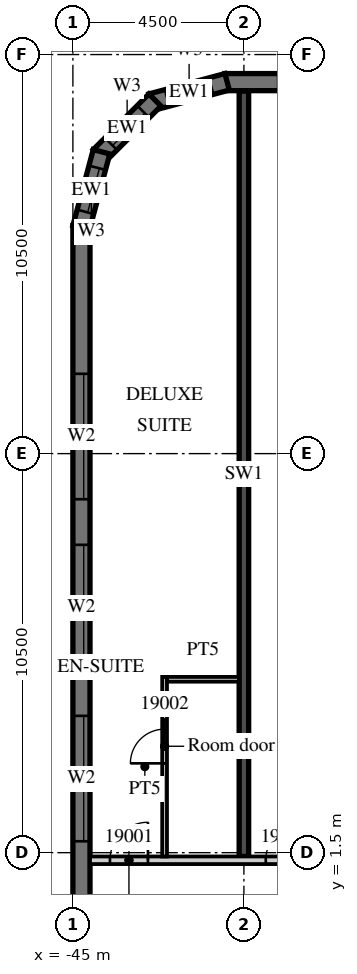
"""IFC4 building model, lengths in metres.
Left out: names, types, materials, properties, quantities, classifications, styles, units other than length and angle.
Written with IfcOpenShell. Run it as: python <this file> out.ifc"""

import sys

from ifc_helpers import new_model, si_unit, direction, frame, frame_2d, origin, place, context, subcontext, project, spatial, polyline, rectangle, outline, extrude, element, fill, save


model = new_model("IFC4")
c1 = context("Model", 3, precision=1e-05, world=origin(), true_north=direction((0.0, 1.0)))
c2 = subcontext(c1, "Body", "Model", "MODEL_VIEW")
j1 = project(units=[si_unit("LENGTHUNIT", "METRE"), si_unit("PLANEANGLEUNIT", "RADIAN")], contexts=[c1])
p1 = place(None, origin())
s1 = spatial("IfcSite", under=j1, at=p1, CompositionType="ELEMENT")
p2 = place(p1, origin())
s2 = spatial("IfcBuilding", under=s1, at=p2, CompositionType="ELEMENT")
p3 = place(p2, frame((0.0, 0.0, 93.0)))
s3 = spatial("IfcBuildingStorey", under=s2, at=p3, CompositionType="ELEMENT", Elevation=93.0)
p4 = place(p3, frame((-40.5, 1.4, 0.0), z_axis=(0.0, 0.0, 1.0), x_axis=(0.0, 1.0, 0.0)))
e1 = element("IfcWall", 1, at=p4, inside=s3, PredefinedType="SHEAR", context=c2, shape_type="SweptSolid", body=[
    extrude(rectangle(XDim=20.14, YDim=0.25, at=frame_2d((10.07, 0.0))), origin(), (0.0, 0.0, 1.0), 3.3),
])
p5 = place(p3, frame((13.5, 21.775, 0.0), z_axis=(0.0, 0.0, 1.0), x_axis=(-1.0, 0.0, 0.0)))
e2 = element("IfcWall", 2, at=p5, inside=s3, PredefinedType="SOLIDWALL", context=c2, shape_type="SweptSolid", body=[
    extrude(rectangle(XDim=54.5, YDim=0.45, at=frame_2d((27.25, 0.0))), origin(), (0.0, 0.0, 1.0), 3.02),
])
p6 = place(p5, frame((0.9, 0.0, 0.45)))
e3 = element("IfcOpeningElement", 3, at=p6, cuts=e2, PredefinedType="OPENING", context=c2, shape_type="SweptSolid", body=[
    extrude(rectangle(XDim=2.7, YDim=2.25, at=frame_2d((1.35, 1.125))), frame((0.0, 0.235, 0.0), z_axis=(0.0, -1.0, 0.0), x_axis=(1.0, 0.0, 0.0)), (0.0, 0.0, 1.0), 0.47),
])
p7 = place(p5, frame((5.4, 0.0, 0.45)))
e4 = element("IfcOpeningElement", 4, at=p7, cuts=e2, PredefinedType="OPENING", context=c2, shape_type="SweptSolid", body=[
    extrude(rectangle(XDim=2.7, YDim=2.25, at=frame_2d((1.35, 1.125))), frame((0.0, 0.235, 0.0), z_axis=(0.0, -1.0, 0.0), x_axis=(1.0, 0.0, 0.0)), (0.0, 0.0, 1.0), 0.47),
])
p8 = place(p5, frame((9.9, 0.0, 0.45)))
e5 = element("IfcOpeningElement", 5, at=p8, cuts=e2, PredefinedType="OPENING", context=c2, shape_type="SweptSolid", body=[
    extrude(rectangle(XDim=2.7, YDim=2.25, at=frame_2d((1.35, 1.125))), frame((0.0, 0.235, 0.0), z_axis=(0.0, -1.0, 0.0), x_axis=(1.0, 0.0, 0.0)), (0.0, 0.0, 1.0), 0.47),
])
p9 = place(p5, frame((14.4, 0.0, 0.45)))
e6 = element("IfcOpeningElement", 6, at=p9, cuts=e2, PredefinedType="OPENING", context=c2, shape_type="SweptSolid", body=[
    extrude(rectangle(XDim=2.7, YDim=2.25, at=frame_2d((1.35, 1.125))), frame((0.0, 0.235, 0.0), z_axis=(0.0, -1.0, 0.0), x_axis=(1.0, 0.0, 0.0)), (0.0, 0.0, 1.0), 0.47),
])
p10 = place(p5, frame((18.9, 0.0, 0.45)))
e7 = element("IfcOpeningElement", 7, at=p10, cuts=e2, PredefinedType="OPENING", context=c2, shape_type="SweptSolid", body=[
    extrude(rectangle(XDim=2.7, YDim=2.25, at=frame_2d((1.35, 1.125))), frame((0.0, 0.235, 0.0), z_axis=(0.0, -1.0, 0.0), x_axis=(1.0, 0.0, 0.0)), (0.0, 0.0, 1.0), 0.47),
])
p11 = place(p5, frame((23.4, 0.0, 0.45)))
e8 = element("IfcOpeningElement", 8, at=p11, cuts=e2, PredefinedType="OPENING", context=c2, shape_type="SweptSolid", body=[
    extrude(rectangle(XDim=2.7, YDim=2.25, at=frame_2d((1.35, 1.125))), frame((0.0, 0.235, 0.0), z_axis=(0.0, -1.0, 0.0), x_axis=(1.0, 0.0, 0.0)), (0.0, 0.0, 1.0), 0.47),
])
p12 = place(p5, frame((27.9, 0.0, 0.45)))
e9 = element("IfcOpeningElement", 9, at=p12, cuts=e2, PredefinedType="OPENING", context=c2, shape_type="SweptSolid", body=[
    extrude(rectangle(XDim=2.7, YDim=2.25, at=frame_2d((1.35, 1.125))), frame((0.0, 0.235, 0.0), z_axis=(0.0, -1.0, 0.0), x_axis=(1.0, 0.0, 0.0)), (0.0, 0.0, 1.0), 0.47),
])
p13 = place(p5, frame((32.4, 0.0, 0.45)))
e10 = element("IfcOpeningElement", 10, at=p13, cuts=e2, PredefinedType="OPENING", context=c2, shape_type="SweptSolid", body=[
    extrude(rectangle(XDim=2.7, YDim=2.25, at=frame_2d((1.35, 1.125))), frame((0.0, 0.235, 0.0), z_axis=(0.0, -1.0, 0.0), x_axis=(1.0, 0.0, 0.0)), (0.0, 0.0, 1.0), 0.47),
])
p14 = place(p5, frame((36.9, 0.0, 0.45)))
e11 = element("IfcOpeningElement", 11, at=p14, cuts=e2, PredefinedType="OPENING", context=c2, shape_type="SweptSolid", body=[
    extrude(rectangle(XDim=2.7, YDim=2.25, at=frame_2d((1.35, 1.125))), frame((0.0, 0.235, 0.0), z_axis=(0.0, -1.0, 0.0), x_axis=(1.0, 0.0, 0.0)), (0.0, 0.0, 1.0), 0.47),
])
p15 = place(p5, frame((41.4, 0.0, 0.45)))
e12 = element("IfcOpeningElement", 12, at=p15, cuts=e2, PredefinedType="OPENING", context=c2, shape_type="SweptSolid", body=[
    extrude(rectangle(XDim=2.7, YDim=2.25, at=frame_2d((1.35, 1.125))), frame((0.0, 0.235, 0.0), z_axis=(0.0, -1.0, 0.0), x_axis=(1.0, 0.0, 0.0)), (0.0, 0.0, 1.0), 0.47),
])
p16 = place(p5, frame((45.9, 0.0, 0.45)))
e13 = element("IfcOpeningElement", 13, at=p16, cuts=e2, PredefinedType="OPENING", context=c2, shape_type="SweptSolid", body=[
    extrude(rectangle(XDim=2.7, YDim=2.25, at=frame_2d((1.35, 1.125))), frame((0.0, 0.235, 0.0), z_axis=(0.0, -1.0, 0.0), x_axis=(1.0, 0.0, 0.0)), (0.0, 0.0, 1.0), 0.47),
])
p17 = place(p5, frame((50.4, 0.0, 0.45)))
e14 = element("IfcOpeningElement", 14, at=p17, cuts=e2, PredefinedType="OPENING", context=c2, shape_type="SweptSolid", body=[
    extrude(rectangle(XDim=2.7, YDim=2.25, at=frame_2d((1.35, 1.125))), frame((0.0, 0.235, 0.0), z_axis=(0.0, -1.0, 0.0), x_axis=(1.0, 0.0, 0.0)), (0.0, 0.0, 1.0), 0.47),
])
p18 = place(p3, frame((-40.942, 21.783, 0.0), z_axis=(0.0, 0.0, 1.0), x_axis=(-0.965926999034, -0.25881466832, 0.0)))
e15 = element("IfcWall", 15, at=p18, inside=s3, PredefinedType="SOLIDWALL", context=c2, shape_type="SweptSolid", body=[
    extrude(outline(polyline([(0.0, -0.225), (2.071, -0.225), (1.95, 0.225), (0.121, 0.225), (0.0, -0.225)])), origin(), (0.0, 0.0, 1.0), 3.02),
])
p19 = place(p18, frame((0.435, 0.0, 0.45)))
e16 = element("IfcOpeningElement", 16, at=p19, cuts=e15, PredefinedType="OPENING", context=c2, shape_type="SweptSolid", body=[
    extrude(rectangle(XDim=1.2, YDim=2.25, at=frame_2d((0.6, 1.125))), frame((0.0, 0.235, 0.0), z_axis=(0.0, -1.0, 0.0), x_axis=(1.0, 0.0, 0.0)), (0.0, 0.0, 1.0), 0.47),
])
p20 = place(p3, frame((-42.841, 21.305, 0.0), z_axis=(0.0, 0.0, 1.0), x_axis=(-0.707106781187, -0.707106781187, 0.0)))
e17 = element("IfcWall", 17, at=p20, inside=s3, PredefinedType="SOLIDWALL", context=c2, shape_type="SweptSolid", body=[
    extrude(outline(polyline([(0.0, -0.225), (2.071, -0.225), (1.95, 0.225), (0.121, 0.225), (0.0, -0.225)])), origin(), (0.0, 0.0, 1.0), 3.02),
])
p21 = place(p20, frame((0.435, 0.0, 0.45)))
e18 = element("IfcOpeningElement", 18, at=p21, cuts=e17, PredefinedType="OPENING", context=c2, shape_type="SweptSolid", body=[
    extrude(rectangle(XDim=1.2, YDim=2.25, at=frame_2d((0.6, 1.125))), frame((0.0, 0.235, 0.0), z_axis=(0.0, -1.0, 0.0), x_axis=(1.0, 0.0, 0.0)), (0.0, 0.0, 1.0), 0.47),
])
p22 = place(p3, frame((-44.247, 19.942, 0.0), z_axis=(0.0, 0.0, 1.0), x_axis=(-0.25881466832, -0.965926999034, 0.0)))
e19 = element("IfcWall", 19, at=p22, inside=s3, PredefinedType="SOLIDWALL", context=c2, shape_type="SweptSolid", body=[
    extrude(outline(polyline([(-0.0, -0.225), (2.07, -0.225), (1.95, 0.225), (0.12, 0.225), (-0.0, -0.225)])), origin(), (0.0, 0.0, 1.0), 3.02),
])
p23 = place(p22, frame((0.435, 0.0, 0.45)))
e20 = element("IfcOpeningElement", 20, at=p23, cuts=e19, PredefinedType="OPENING", context=c2, shape_type="SweptSolid", body=[
    extrude(rectangle(XDim=1.2, YDim=2.25, at=frame_2d((0.6, 1.125))), frame((0.0, 0.235, 0.0), z_axis=(0.0, -1.0, 0.0), x_axis=(1.0, 0.0, 0.0)), (0.0, 0.0, 1.0), 0.47),
])
p24 = place(p3, frame((-44.775, 18.0, 0.0), z_axis=(0.0, 0.0, 1.0), x_axis=(0.0, -1.0, 0.0)))
e21 = element("IfcWall", 21, at=p24, inside=s3, PredefinedType="SOLIDWALL", context=c2, shape_type="SweptSolid", body=[
    extrude(rectangle(XDim=36.0, YDim=0.45, at=frame_2d((18.0, 0.0))), origin(), (0.0, 0.0, 1.0), 3.02),
])
p25 = place(p24, frame((3.9, 0.0, 0.45)))
e22 = element("IfcOpeningElement", 22, at=p25, cuts=e21, PredefinedType="OPENING", context=c2, shape_type="SweptSolid", body=[
    extrude(rectangle(XDim=3.3, YDim=2.25, at=frame_2d((1.65, 1.125))), frame((0.0, 0.235, 0.0), z_axis=(0.0, -1.0, 0.0), x_axis=(1.0, 0.0, 0.0)), (0.0, 0.0, 1.0), 0.47),
])
p26 = place(p24, frame((8.4, 0.0, 0.45)))
e23 = element("IfcOpeningElement", 23, at=p26, cuts=e21, PredefinedType="OPENING", context=c2, shape_type="SweptSolid", body=[
    extrude(rectangle(XDim=3.3, YDim=2.25, at=frame_2d((1.65, 1.125))), frame((0.0, 0.235, 0.0), z_axis=(0.0, -1.0, 0.0), x_axis=(1.0, 0.0, 0.0)), (0.0, 0.0, 1.0), 0.47),
])
p27 = place(p24, frame((12.9, 0.0, 0.45)))
e24 = element("IfcOpeningElement", 24, at=p27, cuts=e21, PredefinedType="OPENING", context=c2, shape_type="SweptSolid", body=[
    extrude(rectangle(XDim=3.3, YDim=2.25, at=frame_2d((1.65, 1.125))), frame((0.0, 0.235, 0.0), z_axis=(0.0, -1.0, 0.0), x_axis=(1.0, 0.0, 0.0)), (0.0, 0.0, 1.0), 0.47),
])
p28 = place(p3, frame((-44.55, 1.3, 0.0), z_axis=(0.0, 0.0, 1.0), x_axis=(1.0, 0.0, 0.0)))
e25 = element("IfcWall", 25, at=p28, inside=s3, PredefinedType="PARTITIONING", context=c2, shape_type="SweptSolid", body=[
    extrude(rectangle(XDim=58.05, YDim=0.2, at=frame_2d((29.025, 0.0))), origin(), (0.0, 0.0, 1.0), 3.02),
])
p29 = place(p28, frame((0.525, 0.0, 0.0)))
e26 = element("IfcOpeningElement", 26, at=p29, cuts=e25, PredefinedType="OPENING", context=c2, shape_type="SweptSolid", body=[
    extrude(rectangle(XDim=1.0, YDim=2.1, at=frame_2d((0.5, 1.05))), frame((0.0, 0.11, 0.0), z_axis=(0.0, -1.0, 0.0), x_axis=(1.0, 0.0, 0.0)), (0.0, 0.0, 1.0), 0.22),
])
p30 = place(p28, frame((4.625, 0.0, 0.0)))
e27 = element("IfcOpeningElement", 27, at=p30, cuts=e25, PredefinedType="OPENING", context=c2, shape_type="SweptSolid", body=[
    extrude(rectangle(XDim=1.0, YDim=2.1, at=frame_2d((0.5, 1.05))), frame((0.0, 0.11, 0.0), z_axis=(0.0, -1.0, 0.0), x_axis=(1.0, 0.0, 0.0)), (0.0, 0.0, 1.0), 0.22),
])
p31 = place(p28, frame((10.987, 0.0, 0.0)))
e28 = element("IfcOpeningElement", 28, at=p31, cuts=e25, PredefinedType="OPENING", context=c2, shape_type="SweptSolid", body=[
    extrude(rectangle(XDim=1.2, YDim=2.1, at=frame_2d((0.6, 1.05))), frame((0.0, 0.11, 0.0), z_axis=(0.0, -1.0, 0.0), x_axis=(1.0, 0.0, 0.0)), (0.0, 0.0, 1.0), 0.22),
])
p32 = place(p28, frame((22.912, 0.0, 0.0)))
e29 = element("IfcOpeningElement", 29, at=p32, cuts=e25, PredefinedType="OPENING", context=c2, shape_type="SweptSolid", body=[
    extrude(rectangle(XDim=1.2, YDim=2.1, at=frame_2d((0.6, 1.05))), frame((0.0, 0.11, 0.0), z_axis=(0.0, -1.0, 0.0), x_axis=(1.0, 0.0, 0.0)), (0.0, 0.0, 1.0), 0.22),
])
p33 = place(p28, frame((28.987, 0.0, 0.0)))
e30 = element("IfcOpeningElement", 30, at=p33, cuts=e25, PredefinedType="OPENING", context=c2, shape_type="SweptSolid", body=[
    extrude(rectangle(XDim=1.2, YDim=2.1, at=frame_2d((0.6, 1.05))), frame((0.0, 0.11, 0.0), z_axis=(0.0, -1.0, 0.0), x_axis=(1.0, 0.0, 0.0)), (0.0, 0.0, 1.0), 0.22),
])
p34 = place(p28, frame((36.125, 0.0, 0.0)))
e31 = element("IfcOpeningElement", 31, at=p34, cuts=e25, PredefinedType="OPENING", context=c2, shape_type="SweptSolid", body=[
    extrude(rectangle(XDim=1.0, YDim=2.1, at=frame_2d((0.5, 1.05))), frame((0.0, 0.11, 0.0), z_axis=(0.0, -1.0, 0.0), x_axis=(1.0, 0.0, 0.0)), (0.0, 0.0, 1.0), 0.22),
])
p35 = place(p28, frame((42.975, 0.0, 0.0)))
e32 = element("IfcOpeningElement", 32, at=p35, cuts=e25, PredefinedType="OPENING", context=c2, shape_type="SweptSolid", body=[
    extrude(rectangle(XDim=1.0, YDim=2.1, at=frame_2d((0.5, 1.05))), frame((0.0, 0.11, 0.0), z_axis=(0.0, -1.0, 0.0), x_axis=(1.0, 0.0, 0.0)), (0.0, 0.0, 1.0), 0.22),
])
p36 = place(p28, frame((47.5, 0.0, 0.0)))
e33 = element("IfcOpeningElement", 33, at=p36, cuts=e25, PredefinedType="OPENING", context=c2, shape_type="SweptSolid", body=[
    extrude(rectangle(XDim=1.0, YDim=2.1, at=frame_2d((0.5, 1.05))), frame((0.0, 0.11, 0.0), z_axis=(0.0, -1.0, 0.0), x_axis=(1.0, 0.0, 0.0)), (0.0, 0.0, 1.0), 0.22),
])
p37 = place(p28, frame((49.6, 0.0, 0.0)))
e34 = element("IfcOpeningElement", 34, at=p37, cuts=e25, PredefinedType="OPENING", context=c2, shape_type="SweptSolid", body=[
    extrude(rectangle(XDim=1.0, YDim=2.1, at=frame_2d((0.5, 1.05))), frame((0.0, 0.11, 0.0), z_axis=(0.0, -1.0, 0.0), x_axis=(1.0, 0.0, 0.0)), (0.0, 0.0, 1.0), 0.22),
])
p38 = place(p28, frame((56.475, 0.0, 0.0)))
e35 = element("IfcOpeningElement", 35, at=p38, cuts=e25, PredefinedType="OPENING", context=c2, shape_type="SweptSolid", body=[
    extrude(rectangle(XDim=1.0, YDim=2.1, at=frame_2d((0.5, 1.05))), frame((0.0, 0.11, 0.0), z_axis=(0.0, -1.0, 0.0), x_axis=(1.0, 0.0, 0.0)), (0.0, 0.0, 1.0), 0.22),
])
p39 = place(p3, frame((-42.587, 1.4, 0.0), z_axis=(0.0, 0.0, 1.0), x_axis=(0.0, 1.0, 0.0)))
e36 = element("IfcWall", 36, at=p39, inside=s3, PredefinedType="PARTITIONING", context=c2, shape_type="SweptSolid", body=[
    extrude(rectangle(XDim=4.725, YDim=0.125, at=frame_2d((2.363, 0.0))), origin(), (0.0, 0.0, 1.0), 3.02),
])
p40 = place(p39, frame((2.45, 0.0, 0.0)))
e37 = element("IfcOpeningElement", 37, at=p40, cuts=e36, PredefinedType="OPENING", context=c2, shape_type="SweptSolid", body=[
    extrude(rectangle(XDim=0.9, YDim=2.1, at=frame_2d((0.45, 1.05))), frame((0.0, 0.073, 0.0), z_axis=(0.0, -1.0, 0.0), x_axis=(1.0, 0.0, 0.0)), (0.0, 0.0, 1.0), 0.145),
])
p41 = place(p3, frame((-42.525, 6.062, 0.0), z_axis=(0.0, 0.0, 1.0), x_axis=(1.0, 0.0, 0.0)))
e38 = element("IfcWall", 38, at=p41, inside=s3, PredefinedType="PARTITIONING", context=c2, shape_type="SweptSolid", body=[
    extrude(rectangle(XDim=1.9, YDim=0.125, at=frame_2d((0.95, 0.0))), origin(), (0.0, 0.0, 1.0), 3.02),
])
p42 = place(p19, origin())
e39 = element("IfcWindow", 39, at=p42, inside=s3, PartitioningType="SINGLE_PANEL", PredefinedType="WINDOW", context=c2, shape_type="SweptSolid", body=[
    extrude(rectangle(XDim=1.2, YDim=2.25, at=frame_2d((0.6, 1.125))), frame((0.0, 0.09, 0.0), z_axis=(0.0, -1.0, 0.0), x_axis=(1.0, 0.0, 0.0)), (0.0, 0.0, 1.0), 0.06),
])
fill(e16, e39)
p43 = place(p21, origin())
e40 = element("IfcWindow", 40, at=p43, inside=s3, PartitioningType="SINGLE_PANEL", PredefinedType="WINDOW", context=c2, shape_type="SweptSolid", body=[
    extrude(rectangle(XDim=1.2, YDim=2.25, at=frame_2d((0.6, 1.125))), frame((0.0, 0.09, 0.0), z_axis=(0.0, -1.0, 0.0), x_axis=(1.0, 0.0, 0.0)), (0.0, 0.0, 1.0), 0.06),
])
fill(e18, e40)
p44 = place(p23, origin())
e41 = element("IfcWindow", 41, at=p44, inside=s3, PartitioningType="SINGLE_PANEL", PredefinedType="WINDOW", context=c2, shape_type="SweptSolid", body=[
    extrude(rectangle(XDim=1.2, YDim=2.25, at=frame_2d((0.6, 1.125))), frame((0.0, 0.09, 0.0), z_axis=(0.0, -1.0, 0.0), x_axis=(1.0, 0.0, 0.0)), (0.0, 0.0, 1.0), 0.06),
])
fill(e20, e41)
p45 = place(p25, origin())
e42 = element("IfcWindow", 42, at=p45, inside=s3, PartitioningType="SINGLE_PANEL", PredefinedType="WINDOW", context=c2, shape_type="SweptSolid", body=[
    extrude(rectangle(XDim=3.3, YDim=2.25, at=frame_2d((1.65, 1.125))), frame((0.0, 0.09, 0.0), z_axis=(0.0, -1.0, 0.0), x_axis=(1.0, 0.0, 0.0)), (0.0, 0.0, 1.0), 0.06),
])
fill(e22, e42)
p46 = place(p26, origin())
e43 = element("IfcWindow", 43, at=p46, inside=s3, PartitioningType="SINGLE_PANEL", PredefinedType="WINDOW", context=c2, shape_type="SweptSolid", body=[
    extrude(rectangle(XDim=3.3, YDim=2.25, at=frame_2d((1.65, 1.125))), frame((0.0, 0.09, 0.0), z_axis=(0.0, -1.0, 0.0), x_axis=(1.0, 0.0, 0.0)), (0.0, 0.0, 1.0), 0.06),
])
fill(e23, e43)
p47 = place(p27, origin())
e44 = element("IfcWindow", 44, at=p47, inside=s3, PartitioningType="SINGLE_PANEL", PredefinedType="WINDOW", context=c2, shape_type="SweptSolid", body=[
    extrude(rectangle(XDim=3.3, YDim=2.25, at=frame_2d((1.65, 1.125))), frame((0.0, 0.09, 0.0), z_axis=(0.0, -1.0, 0.0), x_axis=(1.0, 0.0, 0.0)), (0.0, 0.0, 1.0), 0.06),
])
fill(e24, e44)
p48 = place(p29, origin())
e45 = element("IfcDoor", 45, at=p48, inside=s3, OperationType="SINGLE_SWING_RIGHT", PredefinedType="DOOR", context=c2, shape_type="SweptSolid", body=[
    extrude(rectangle(XDim=1.0, YDim=2.1, at=frame_2d((0.5, 1.05))), frame((0.0, 0.025, 0.0), z_axis=(0.0, -1.0, 0.0), x_axis=(1.0, 0.0, 0.0)), (0.0, 0.0, 1.0), 0.05),
])
fill(e26, e45)
p49 = place(p40, origin())
e46 = element("IfcDoor", 46, at=p49, inside=s3, OperationType="SINGLE_SWING_LEFT", PredefinedType="DOOR", context=c2, shape_type="SweptSolid", body=[
    extrude(rectangle(XDim=0.9, YDim=2.1, at=frame_2d((0.45, 1.05))), frame((0.0, 0.025, 0.0), z_axis=(0.0, -1.0, 0.0), x_axis=(1.0, 0.0, 0.0)), (0.0, 0.0, 1.0), 0.05),
])
fill(e37, e46)
p50 = place(p30, origin())
e47 = element("IfcDoor", 47, at=p50, inside=s3, OperationType="SINGLE_SWING_RIGHT", PredefinedType="DOOR", context=c2, shape_type="SweptSolid", body=[
    extrude(rectangle(XDim=1.0, YDim=2.1, at=frame_2d((0.5, 1.05))), frame((0.0, 0.025, 0.0), z_axis=(0.0, -1.0, 0.0), x_axis=(1.0, 0.0, 0.0)), (0.0, 0.0, 1.0), 0.05),
])
fill(e27, e47)
save(model, sys.argv[1])
